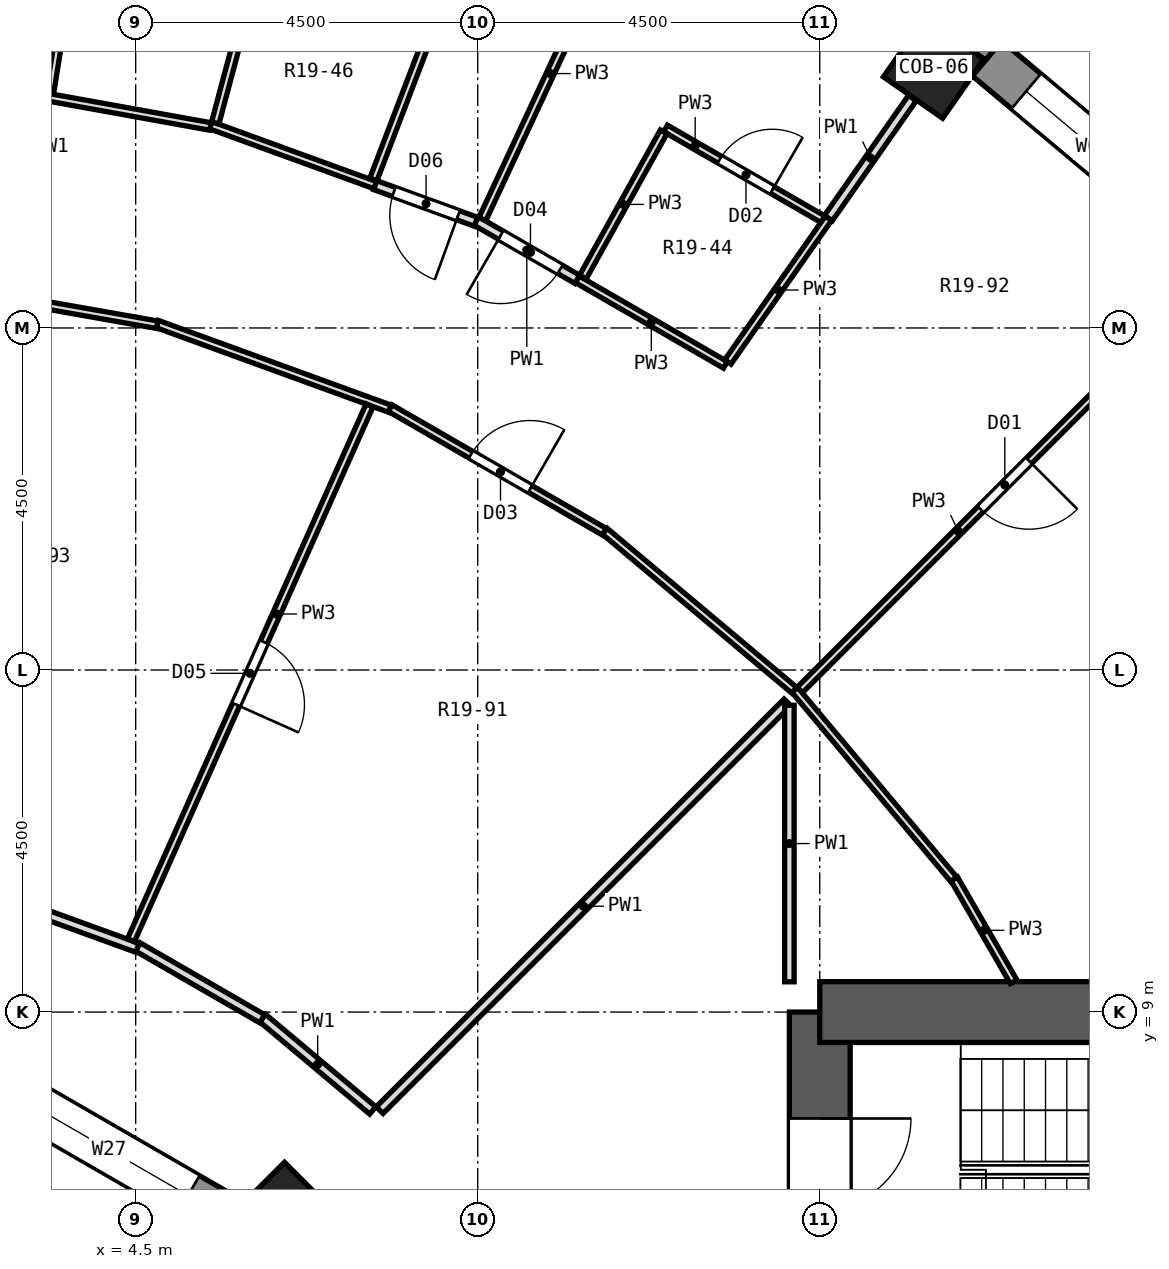
"""IFC4 building model, lengths in metres.
Left out: names, types, materials, properties, quantities, classifications, styles, units other than length and angle.
Written with IfcOpenShell. Run it as: python <this file> out.ifc"""

import sys

from ifc_helpers import new_model, si_unit, direction, frame, frame_2d, origin, origin_2d, place, context, subcontext, project, spatial, polyline, rectangle, outline, extrude, element, fill, save


model = new_model("IFC4")
c1 = context("Model", 3, precision=1e-05, world=origin(), true_north=direction((0.0, 1.0)))
c2 = subcontext(c1, "Body", "Model", "MODEL_VIEW")
j1 = project(units=[si_unit("LENGTHUNIT", "METRE"), si_unit("PLANEANGLEUNIT", "RADIAN")], contexts=[c1])
p1 = place(None, origin())
s1 = spatial("IfcSite", under=j1, at=p1, CompositionType="ELEMENT")
p2 = place(p1, origin())
s2 = spatial("IfcBuilding", under=s1, at=p2, CompositionType="ELEMENT")
p3 = place(p2, frame((0.0, 0.0, 111.7)))
s3 = spatial("IfcBuildingStorey", under=s2, at=p3, CompositionType="ELEMENT", Elevation=111.7)
p4 = place(p3, frame((14.999, 21.421, 0.0), z_axis=(0.0, 0.0, 1.0), x_axis=(0.573576436351, 0.819152044289, 0.0)))
e1 = element("IfcColumn", 1, at=p4, inside=s3, PredefinedType="COLUMN", context=c2, shape_type="SweptSolid", body=[
    extrude(rectangle(XDim=0.95, YDim=0.95, at=origin_2d()), origin(), (0.0, 0.0, 1.0), 3.3),
])
p5 = place(p3, frame((6.458, 6.458, 0.0), z_axis=(0.0, 0.0, 1.0), x_axis=(0.707106781187, 0.707106781187, 0.0)))
e2 = element("IfcColumn", 2, at=p5, inside=s3, PredefinedType="COLUMN", context=c2, shape_type="SweptSolid", body=[
    extrude(rectangle(XDim=0.8, YDim=0.8, at=origin_2d()), origin(), (0.0, 0.0, 1.0), 3.3),
])
p6 = place(p3, frame((13.5, -9.0, 0.0), z_axis=(0.0, 0.0, 1.0), x_axis=(0.0, 1.0, 0.0)))
e3 = element("IfcWall", 3, at=p6, inside=s3, PredefinedType="SHEAR", context=c2, shape_type="SweptSolid", body=[
    extrude(rectangle(XDim=18.0, YDim=0.8, at=frame_2d((9.0, 0.0))), origin(), (0.0, 0.0, 1.0), 3.3),
])
p7 = place(p6, frame((15.4, 0.0, 0.0)))
e4 = element("IfcOpeningElement", 4, at=p7, cuts=e3, PredefinedType="OPENING", context=c2, shape_type="SweptSolid", body=[
    extrude(rectangle(XDim=1.2, YDim=2.1, at=frame_2d((0.6, 1.05))), frame((0.0, 0.412, 0.0), z_axis=(0.0, -1.0, 0.0), x_axis=(1.0, 0.0, 0.0)), (0.0, 0.0, 1.0), 0.824),
])
p8 = place(p6, frame((1.4, 0.0, 0.0)))
e5 = element("IfcOpeningElement", 5, at=p8, cuts=e3, PredefinedType="OPENING", context=c2, shape_type="SweptSolid", body=[
    extrude(rectangle(XDim=1.2, YDim=2.1, at=frame_2d((0.6, 1.05))), frame((0.0, 0.412, 0.0), z_axis=(0.0, -1.0, 0.0), x_axis=(1.0, 0.0, 0.0)), (0.0, 0.0, 1.0), 0.824),
])
p9 = place(p6, frame((7.5, 0.0, 0.0)))
e6 = element("IfcOpeningElement", 6, at=p9, cuts=e3, PredefinedType="OPENING", context=c2, shape_type="SweptSolid", body=[
    extrude(rectangle(XDim=3.0, YDim=2.4, at=frame_2d((1.5, 1.2))), frame((0.0, 0.412, 0.0), z_axis=(0.0, -1.0, 0.0), x_axis=(1.0, 0.0, 0.0)), (0.0, 0.0, 1.0), 0.824),
])
p10 = place(p3, frame((13.5, 9.0, 0.0), z_axis=(0.0, 0.0, 1.0), x_axis=(1.0, 0.0, 0.0)))
e7 = element("IfcWall", 7, at=p10, inside=s3, PredefinedType="SHEAR", context=c2, shape_type="SweptSolid", body=[
    extrude(rectangle(XDim=10.4, YDim=0.8, at=frame_2d((5.2, 0.0))), origin(), (0.0, 0.0, 1.0), 3.3),
])
p11 = place(p3, frame((18.494, 19.202, 0.0), z_axis=(0.0, 0.0, 1.0), x_axis=(-0.766055462616, 0.642774476932, 0.0)))
e8 = element("IfcWall", 8, at=p11, inside=s3, PredefinedType="SOLIDWALL", context=c2, shape_type="SweptSolid", body=[
    extrude(rectangle(XDim=3.648, YDim=0.6, at=frame_2d((1.824, 0.0))), origin(), (0.0, 0.0, 1.0), 2.8),
])
p12 = place(p11, frame((0.674, 0.0, 0.9)))
e9 = element("IfcOpeningElement", 9, at=p12, cuts=e8, PredefinedType="OPENING", context=c2, shape_type="SweptSolid", body=[
    extrude(rectangle(XDim=2.3, YDim=1.8, at=frame_2d((1.15, 0.9))), frame((0.0, 0.312, 0.0), z_axis=(0.0, -1.0, 0.0), x_axis=(1.0, 0.0, 0.0)), (0.0, 0.0, 1.0), 0.624),
])
p13 = place(p3, origin())
e10 = element("IfcWall", 10, at=p13, inside=s3, PredefinedType="SOLIDWALL", context=c2, shape_type="SweptSolid", body=[
    extrude(outline(polyline([(15.028, 22.382), (14.728, 21.862), (14.882, 22.083), (15.661, 21.538), (15.506, 21.317), (15.892, 21.777), (15.028, 22.382)])), origin(), (0.0, 0.0, 1.0), 2.8),
])
p14 = place(p3, frame((5.773, 6.251, 0.0), z_axis=(0.0, 0.0, 1.0), x_axis=(-0.86604563398, 0.499964958637, 0.0)))
e11 = element("IfcWall", 11, at=p14, inside=s3, PredefinedType="SOLIDWALL", context=c2, shape_type="SweptSolid", body=[
    extrude(rectangle(XDim=3.747, YDim=0.6, at=frame_2d((1.874, 0.0))), origin(), (0.0, 0.0, 1.0), 2.8),
])
p15 = place(p14, frame((0.674, 0.0, 0.9)))
e12 = element("IfcOpeningElement", 12, at=p15, cuts=e11, PredefinedType="OPENING", context=c2, shape_type="SweptSolid", body=[
    extrude(rectangle(XDim=2.4, YDim=1.8, at=frame_2d((1.2, 0.9))), frame((0.0, 0.312, 0.0), z_axis=(0.0, -1.0, 0.0), x_axis=(1.0, 0.0, 0.0)), (0.0, 0.0, 1.0), 0.624),
])
p16 = place(p3, frame((15.269, 10.753, 0.0), z_axis=(0.0, 0.0, 1.0), x_axis=(0.499614353746, -0.866247942296, 0.0)))
e13 = element("IfcWall", 13, at=p16, inside=s3, PredefinedType="PARTITIONING", context=c2, shape_type="SweptSolid", body=[
    extrude(rectangle(XDim=1.564, YDim=0.1, at=frame_2d((0.782, 0.0))), origin(), (0.0, 0.0, 1.0), 2.8),
])
p17 = place(p3, frame((13.169, 13.241, 0.0), z_axis=(0.0, 0.0, 1.0), x_axis=(0.642806814248, -0.766028328168, 0.0)))
e14 = element("IfcWall", 14, at=p17, inside=s3, PredefinedType="PARTITIONING", context=c2, shape_type="SweptSolid", body=[
    extrude(rectangle(XDim=3.255, YDim=0.1, at=frame_2d((1.628, 0.0))), origin(), (0.0, 0.0, 1.0), 2.8),
])
p18 = place(p3, frame((6.169, 8.922, 0.0), z_axis=(0.0, 0.0, 1.0), x_axis=(0.766048022013, -0.642783344503, 0.0)))
e15 = element("IfcWall", 15, at=p18, inside=s3, PredefinedType="PARTITIONING", context=c2, shape_type="SweptSolid", body=[
    extrude(rectangle(XDim=1.892, YDim=0.125, at=frame_2d((0.946, 0.0))), origin(), (0.0, 0.0, 1.0), 2.8),
])
p19 = place(p3, frame((10.67, 15.327, 0.0), z_axis=(0.0, 0.0, 1.0), x_axis=(0.766028328168, -0.642806814248, 0.0)))
e16 = element("IfcWall", 16, at=p19, inside=s3, PredefinedType="PARTITIONING", context=c2, shape_type="SweptSolid", body=[
    extrude(rectangle(XDim=3.255, YDim=0.1, at=frame_2d((1.628, 0.0))), origin(), (0.0, 0.0, 1.0), 2.8),
])
p20 = place(p3, frame((4.527, 9.858, 0.0), z_axis=(0.0, 0.0, 1.0), x_axis=(0.86592101019, -0.500180771434, 0.0)))
e17 = element("IfcWall", 17, at=p20, inside=s3, PredefinedType="PARTITIONING", context=c2, shape_type="SweptSolid", body=[
    extrude(rectangle(XDim=1.89, YDim=0.125, at=frame_2d((0.945, 0.0))), origin(), (0.0, 0.0, 1.0), 2.8),
])
p21 = place(p3, frame((7.846, 16.946, 0.0), z_axis=(0.0, 0.0, 1.0), x_axis=(0.866135643811, -0.499809010043, 0.0)))
e18 = element("IfcWall", 18, at=p21, inside=s3, PredefinedType="PARTITIONING", context=c2, shape_type="SweptSolid", body=[
    extrude(rectangle(XDim=3.256, YDim=0.1, at=frame_2d((1.628, 0.0))), origin(), (0.0, 0.0, 1.0), 2.8),
])
p22 = place(p21, frame((1.228, 0.0, 0.0)))
e19 = element("IfcOpeningElement", 19, at=p22, cuts=e18, PredefinedType="OPENING", context=c2, shape_type="SweptSolid", body=[
    extrude(rectangle(XDim=0.9, YDim=2.1, at=frame_2d((0.45, 1.05))), frame((0.0, 0.062, 0.0), z_axis=(0.0, -1.0, 0.0), x_axis=(1.0, 0.0, 0.0)), (0.0, 0.0, 1.0), 0.124),
])
p23 = place(p3, frame((10.31, 18.64, 0.0), z_axis=(0.0, 0.0, 1.0), x_axis=(0.865856719536, -0.500292055938, 0.0)))
e20 = element("IfcWall", 20, at=p23, inside=s3, PredefinedType="PARTITIONING", context=c2, shape_type="SweptSolid", body=[
    extrude(rectangle(XDim=2.251, YDim=0.1, at=frame_2d((1.125, 0.0))), origin(), (0.0, 0.0, 1.0), 2.8),
])
p24 = place(p3, frame((8.98, 19.408, 0.0), z_axis=(0.0, 0.0, 1.0), x_axis=(0.866013487713, -0.500020638674, 0.0)))
e21 = element("IfcWall", 21, at=p24, inside=s3, PredefinedType="PARTITIONING", context=c2, shape_type="SweptSolid", body=[
    extrude(rectangle(XDim=1.536, YDim=0.125, at=frame_2d((0.768, 0.0))), origin(), (0.0, 0.0, 1.0), 2.8),
])
p25 = place(p24, frame((0.375, 0.0, 0.0)))
e22 = element("IfcOpeningElement", 22, at=p25, cuts=e21, PredefinedType="OPENING", context=c2, shape_type="SweptSolid", body=[
    extrude(rectangle(XDim=0.9, YDim=2.1, at=frame_2d((0.45, 1.05))), frame((0.0, 0.074, 0.0), z_axis=(0.0, -1.0, 0.0), x_axis=(1.0, 0.0, 0.0)), (0.0, 0.0, 1.0), 0.149),
])
p26 = place(p3, frame((11.471, 20.625, 0.0), z_axis=(0.0, 0.0, 1.0), x_axis=(0.866161784063, -0.499763707994, 0.0)))
e23 = element("IfcWall", 23, at=p26, inside=s3, PredefinedType="PARTITIONING", context=c2, shape_type="SweptSolid", body=[
    extrude(rectangle(XDim=2.391, YDim=0.1, at=frame_2d((1.195, 0.0))), origin(), (0.0, 0.0, 1.0), 2.8),
])
p27 = place(p26, frame((0.822, 0.0, 0.0)))
e24 = element("IfcOpeningElement", 24, at=p27, cuts=e23, PredefinedType="OPENING", context=c2, shape_type="SweptSolid", body=[
    extrude(rectangle(XDim=0.8, YDim=2.1, at=frame_2d((0.4, 1.05))), frame((0.0, 0.062, 0.0), z_axis=(0.0, -1.0, 0.0), x_axis=(1.0, 0.0, 0.0)), (0.0, 0.0, 1.0), 0.124),
])
p28 = place(p3, frame((2.746, 10.492, 0.0), z_axis=(0.0, 0.0, 1.0), x_axis=(0.939744390825, -0.341877872803, 0.0)))
e25 = element("IfcWall", 25, at=p28, inside=s3, PredefinedType="PARTITIONING", context=c2, shape_type="SweptSolid", body=[
    extrude(rectangle(XDim=1.89, YDim=0.125, at=frame_2d((0.945, 0.0))), origin(), (0.0, 0.0, 1.0), 2.8),
])
p29 = place(p3, frame((4.784, 18.051, 0.0), z_axis=(0.0, 0.0, 1.0), x_axis=(0.939697033511, -0.34200801922, 0.0)))
e26 = element("IfcWall", 26, at=p29, inside=s3, PredefinedType="PARTITIONING", context=c2, shape_type="SweptSolid", body=[
    extrude(rectangle(XDim=3.255, YDim=0.1, at=frame_2d((1.627, 0.0))), origin(), (0.0, 0.0, 1.0), 2.8),
])
p30 = place(p3, frame((5.485, 20.667, 0.0), z_axis=(0.0, 0.0, 1.0), x_axis=(0.939734670151, -0.34190459154, 0.0)))
e27 = element("IfcWall", 27, at=p30, inside=s3, PredefinedType="PARTITIONING", context=c2, shape_type="SweptSolid", body=[
    extrude(rectangle(XDim=2.306, YDim=0.1, at=frame_2d((1.153, 0.0))), origin(), (0.0, 0.0, 1.0), 2.8),
])
p31 = place(p3, frame((7.652, 19.879, 0.0), z_axis=(0.0, 0.0, 1.0), x_axis=(0.939813657692, -0.341687413896, 0.0)))
e28 = element("IfcWall", 28, at=p31, inside=s3, PredefinedType="PARTITIONING", context=c2, shape_type="SweptSolid", body=[
    extrude(rectangle(XDim=1.409, YDim=0.125, at=frame_2d((0.705, 0.0))), origin(), (0.0, 0.0, 1.0), 2.8),
])
p32 = place(p31, frame((0.261, 0.0, 0.0)))
e29 = element("IfcOpeningElement", 29, at=p32, cuts=e28, PredefinedType="OPENING", context=c2, shape_type="SweptSolid", body=[
    extrude(rectangle(XDim=0.9, YDim=2.1, at=frame_2d((0.45, 1.05))), frame((0.0, 0.074, 0.0), z_axis=(0.0, -1.0, 0.0), x_axis=(1.0, 0.0, 0.0)), (0.0, 0.0, 1.0), 0.149),
])
p33 = place(p3, frame((3.313, 21.042, 0.0), z_axis=(0.0, 0.0, 1.0), x_axis=(0.984157440959, -0.17729673264, 0.0)))
e30 = element("IfcWall", 30, at=p33, inside=s3, PredefinedType="PARTITIONING", context=c2, shape_type="SweptSolid", body=[
    extrude(rectangle(XDim=2.205, YDim=0.1, at=frame_2d((1.102, 0.0))), origin(), (0.0, 0.0, 1.0), 2.8),
])
p34 = place(p3, frame((1.577, 18.608, 0.0), z_axis=(0.0, 0.0, 1.0), x_axis=(0.984812236301, -0.173622749755, 0.0)))
e31 = element("IfcWall", 31, at=p34, inside=s3, PredefinedType="PARTITIONING", context=c2, shape_type="SweptSolid", body=[
    extrude(rectangle(XDim=3.255, YDim=0.1, at=frame_2d((1.628, 0.0))), origin(), (0.0, 0.0, 1.0), 2.8),
])
p35 = place(p3, frame((13.237, 13.237, 0.0), z_axis=(0.0, 0.0, 1.0), x_axis=(0.707106781187, 0.707106781187, 0.0)))
e32 = element("IfcWall", 32, at=p35, inside=s3, PredefinedType="PARTITIONING", context=c2, shape_type="SweptSolid", body=[
    extrude(rectangle(XDim=6.945, YDim=0.1, at=frame_2d((3.472, 0.0))), origin(), (0.0, 0.0, 1.0), 2.8),
])
p36 = place(p35, frame((3.364, 0.0, 0.0)))
e33 = element("IfcOpeningElement", 33, at=p36, cuts=e32, PredefinedType="OPENING", context=c2, shape_type="SweptSolid", body=[
    extrude(rectangle(XDim=0.9, YDim=2.1, at=frame_2d((0.45, 1.05))), frame((0.0, 0.062, 0.0), z_axis=(0.0, -1.0, 0.0), x_axis=(1.0, 0.0, 0.0)), (0.0, 0.0, 1.0), 0.124),
])
p37 = place(p3, frame((7.71, 7.71, 0.0), z_axis=(0.0, 0.0, 1.0), x_axis=(0.707106781187, 0.707106781187, 0.0)))
e34 = element("IfcWall", 34, at=p37, inside=s3, PredefinedType="PARTITIONING", context=c2, shape_type="SweptSolid", body=[
    extrude(rectangle(XDim=7.587, YDim=0.125, at=frame_2d((3.793, 0.0))), origin(), (0.0, 0.0, 1.0), 2.8),
])
p38 = place(p3, frame((12.291, 17.553, 0.0), z_axis=(0.0, 0.0, 1.0), x_axis=(0.573582946976, 0.819147485462, 0.0)))
e35 = element("IfcWall", 35, at=p38, inside=s3, PredefinedType="PARTITIONING", context=c2, shape_type="SweptSolid", body=[
    extrude(rectangle(XDim=2.31, YDim=0.1, at=frame_2d((1.155, 0.0))), origin(), (0.0, 0.0, 1.0), 2.8),
])
p39 = place(p3, frame((13.614, 19.446, 0.0), z_axis=(0.0, 0.0, 1.0), x_axis=(0.573470846205, 0.819225969164, 0.0)))
e36 = element("IfcWall", 36, at=p39, inside=s3, PredefinedType="PARTITIONING", context=c2, shape_type="SweptSolid", body=[
    extrude(rectangle(XDim=1.927, YDim=0.125, at=frame_2d((0.964, 0.0))), origin(), (0.0, 0.0, 1.0), 2.8),
])
p40 = place(p3, frame((10.383, 18.67, 0.0), z_axis=(0.0, 0.0, 1.0), x_axis=(0.486154549708, 0.873872847615, 0.0)))
e37 = element("IfcWall", 37, at=p40, inside=s3, PredefinedType="PARTITIONING", context=c2, shape_type="SweptSolid", body=[
    extrude(rectangle(XDim=2.188, YDim=0.1, at=frame_2d((1.094, 0.0))), origin(), (0.0, 0.0, 1.0), 2.8),
])
p41 = place(p3, frame((9.062, 19.433, 0.0), z_axis=(0.0, 0.0, 1.0), x_axis=(0.422606972268, 0.906313051319, 0.0)))
e38 = element("IfcWall", 38, at=p41, inside=s3, PredefinedType="PARTITIONING", context=c2, shape_type="SweptSolid", body=[
    extrude(rectangle(XDim=4.224, YDim=0.1, at=frame_2d((2.112, 0.0))), origin(), (0.0, 0.0, 1.0), 2.8),
])
p42 = place(p3, frame((4.437, 9.945, 0.0), z_axis=(0.0, 0.0, 1.0), x_axis=(0.407452204653, 0.913226533191, 0.0)))
e39 = element("IfcWall", 39, at=p42, inside=s3, PredefinedType="PARTITIONING", context=c2, shape_type="SweptSolid", body=[
    extrude(rectangle(XDim=7.705, YDim=0.1, at=frame_2d((3.853, 0.0))), origin(), (0.0, 0.0, 1.0), 2.8),
])
p43 = place(p42, frame((3.395, 0.0, 0.0)))
e40 = element("IfcOpeningElement", 40, at=p43, cuts=e39, PredefinedType="OPENING", context=c2, shape_type="SweptSolid", body=[
    extrude(rectangle(XDim=0.9, YDim=2.1, at=frame_2d((0.45, 1.05))), frame((0.0, 0.062, 0.0), z_axis=(0.0, -1.0, 0.0), x_axis=(1.0, 0.0, 0.0)), (0.0, 0.0, 1.0), 0.124),
])
p44 = place(p3, frame((7.627, 19.954, 0.0), z_axis=(0.0, 0.0, 1.0), x_axis=(0.356937039246, 0.934128444067, 0.0)))
e41 = element("IfcWall", 41, at=p44, inside=s3, PredefinedType="PARTITIONING", context=c2, shape_type="SweptSolid", body=[
    extrude(rectangle(XDim=2.188, YDim=0.1, at=frame_2d((1.094, 0.0))), origin(), (0.0, 0.0, 1.0), 2.8),
])
p45 = place(p3, frame((5.547, 20.698, 0.0), z_axis=(0.0, 0.0, 1.0), x_axis=(0.258516199654, 0.966006922603, 0.0)))
e42 = element("IfcWall", 42, at=p45, inside=s3, PredefinedType="PARTITIONING", context=c2, shape_type="SweptSolid", body=[
    extrude(rectangle(XDim=4.237, YDim=0.1, at=frame_2d((2.118, 0.0))), origin(), (0.0, 0.0, 1.0), 2.8),
])
p46 = place(p3, frame((3.372, 21.095, 0.0), z_axis=(0.0, 0.0, 1.0), x_axis=(0.157825077305, 0.987467085514, 0.0)))
e43 = element("IfcWall", 43, at=p46, inside=s3, PredefinedType="PARTITIONING", context=c2, shape_type="SweptSolid", body=[
    extrude(rectangle(XDim=2.187, YDim=0.1, at=frame_2d((1.094, 0.0))), origin(), (0.0, 0.0, 1.0), 2.8),
])
p47 = place(p3, frame((13.1, 9.398, 0.0), z_axis=(0.0, 0.0, 1.0), x_axis=(0.0, 1.0, 0.0)))
e44 = element("IfcWall", 44, at=p47, inside=s3, PredefinedType="PARTITIONING", context=c2, shape_type="SweptSolid", body=[
    extrude(rectangle(XDim=3.639, YDim=0.125, at=frame_2d((1.819, 0.0))), origin(), (0.0, 0.0, 1.0), 2.8),
])
p48 = place(p12, origin())
e45 = element("IfcWindow", 45, at=p48, inside=s3, PartitioningType="SINGLE_PANEL", PredefinedType="WINDOW", context=c2, shape_type="SweptSolid", body=[
    extrude(rectangle(XDim=2.3, YDim=1.8, at=frame_2d((1.15, 0.9))), frame((0.0, 0.18, 0.0), z_axis=(0.0, -1.0, 0.0), x_axis=(1.0, 0.0, 0.0)), (0.0, 0.0, 1.0), 0.06),
])
fill(e9, e45)
p49 = place(p15, origin())
e46 = element("IfcWindow", 46, at=p49, inside=s3, PartitioningType="SINGLE_PANEL", PredefinedType="WINDOW", context=c2, shape_type="SweptSolid", body=[
    extrude(rectangle(XDim=2.4, YDim=1.8, at=frame_2d((1.2, 0.9))), frame((0.0, -0.12, 0.0), z_axis=(0.0, -1.0, 0.0), x_axis=(1.0, 0.0, 0.0)), (0.0, 0.0, 1.0), 0.06),
])
fill(e12, e46)
p50 = place(p36, frame((0.9, 0.0, 0.0), z_axis=(0.0, 0.0, 1.0), x_axis=(-1.0, 0.0, 0.0)))
e47 = element("IfcDoor", 47, at=p50, inside=s3, OperationType="SINGLE_SWING_LEFT", PredefinedType="DOOR", context=c2, shape_type="SweptSolid", body=[
    extrude(rectangle(XDim=0.9, YDim=2.1, at=frame_2d((0.45, 1.05))), frame((0.0, 0.025, 0.0), z_axis=(0.0, -1.0, 0.0), x_axis=(1.0, 0.0, 0.0)), (0.0, 0.0, 1.0), 0.05),
])
fill(e33, e47)
p51 = place(p27, origin())
e48 = element("IfcDoor", 48, at=p51, inside=s3, OperationType="SINGLE_SWING_RIGHT", PredefinedType="DOOR", context=c2, shape_type="SweptSolid", body=[
    extrude(rectangle(XDim=0.8, YDim=2.1, at=frame_2d((0.4, 1.05))), frame((0.0, 0.025, 0.0), z_axis=(0.0, -1.0, 0.0), x_axis=(1.0, 0.0, 0.0)), (0.0, 0.0, 1.0), 0.05),
])
fill(e24, e48)
p52 = place(p22, origin())
e49 = element("IfcDoor", 49, at=p52, inside=s3, OperationType="SINGLE_SWING_RIGHT", PredefinedType="DOOR", context=c2, shape_type="SweptSolid", body=[
    extrude(rectangle(XDim=0.9, YDim=2.1, at=frame_2d((0.45, 1.05))), frame((0.0, 0.025, 0.0), z_axis=(0.0, -1.0, 0.0), x_axis=(1.0, 0.0, 0.0)), (0.0, 0.0, 1.0), 0.05),
])
fill(e19, e49)
p53 = place(p25, frame((0.9, 0.0, 0.0), z_axis=(0.0, 0.0, 1.0), x_axis=(-1.0, 0.0, 0.0)))
e50 = element("IfcDoor", 50, at=p53, inside=s3, OperationType="SINGLE_SWING_RIGHT", PredefinedType="DOOR", context=c2, shape_type="SweptSolid", body=[
    extrude(rectangle(XDim=0.9, YDim=2.1, at=frame_2d((0.45, 1.05))), frame((0.0, 0.025, 0.0), z_axis=(0.0, -1.0, 0.0), x_axis=(1.0, 0.0, 0.0)), (0.0, 0.0, 1.0), 0.05),
])
fill(e22, e50)
p54 = place(p43, frame((0.9, 0.0, 0.0), z_axis=(0.0, 0.0, 1.0), x_axis=(-1.0, 0.0, 0.0)))
e51 = element("IfcDoor", 51, at=p54, inside=s3, OperationType="SINGLE_SWING_RIGHT", PredefinedType="DOOR", context=c2, shape_type="SweptSolid", body=[
    extrude(rectangle(XDim=0.9, YDim=2.1, at=frame_2d((0.45, 1.05))), frame((0.0, 0.025, 0.0), z_axis=(0.0, -1.0, 0.0), x_axis=(1.0, 0.0, 0.0)), (0.0, 0.0, 1.0), 0.05),
])
fill(e40, e51)
p55 = place(p32, frame((0.9, 0.0, 0.0), z_axis=(0.0, 0.0, 1.0), x_axis=(-1.0, 0.0, 0.0)))
e52 = element("IfcDoor", 52, at=p55, inside=s3, OperationType="SINGLE_SWING_LEFT", PredefinedType="DOOR", context=c2, shape_type="SweptSolid", body=[
    extrude(rectangle(XDim=0.9, YDim=2.1, at=frame_2d((0.45, 1.05))), frame((0.0, 0.025, 0.0), z_axis=(0.0, -1.0, 0.0), x_axis=(1.0, 0.0, 0.0)), (0.0, 0.0, 1.0), 0.05),
])
fill(e29, e52)
p56 = place(p7, frame((1.2, 0.0, 0.0), z_axis=(0.0, 0.0, 1.0), x_axis=(-1.0, 0.0, 0.0)))
e53 = element("IfcDoor", 53, at=p56, inside=s3, OperationType="SINGLE_SWING_LEFT", PredefinedType="DOOR", context=c2, shape_type="SweptSolid", body=[
    extrude(rectangle(XDim=1.2, YDim=2.1, at=frame_2d((0.6, 1.05))), frame((0.0, 0.025, 0.0), z_axis=(0.0, -1.0, 0.0), x_axis=(1.0, 0.0, 0.0)), (0.0, 0.0, 1.0), 0.05),
])
fill(e4, e53)
save(model, sys.argv[1])
